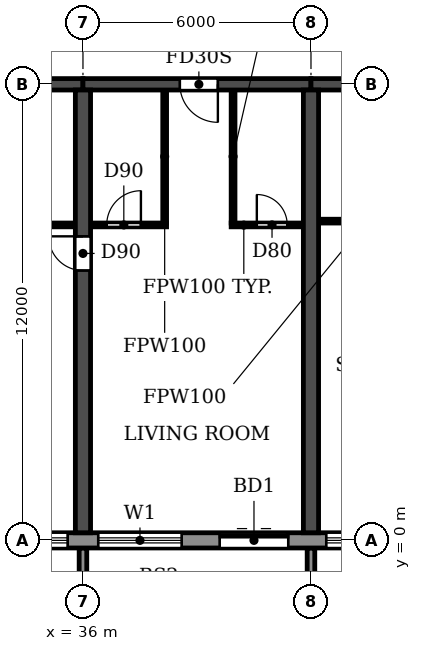
"""IFC4 building model, lengths in metres.
Left out: names, types, materials, properties, quantities, classifications, styles, units other than length and angle.
Written with IfcOpenShell. Run it as: python <this file> out.ifc"""

import sys

from ifc_helpers import new_model, si_unit, direction, frame, frame_2d, origin, place, context, subcontext, project, spatial, polyline, rectangle, outline, extrude, source, transform, mapped, element, fill, save


model = new_model("IFC4")
c1 = context("Model", 3, precision=1e-05, world=origin(), true_north=direction((0.0, 1.0)))
c2 = subcontext(c1, "Body", "Model", "MODEL_VIEW")
j1 = project(units=[si_unit("LENGTHUNIT", "METRE"), si_unit("PLANEANGLEUNIT", "RADIAN")], contexts=[c1])
p1 = place(None, origin())
s1 = spatial("IfcSite", under=j1, at=p1, CompositionType="ELEMENT")
p2 = place(p1, origin())
s2 = spatial("IfcBuilding", under=s1, at=p2, CompositionType="ELEMENT")
p3 = place(p2, frame((0.0, 0.0, 43.2)))
s3 = spatial("IfcBuildingStorey", under=s2, at=p3, CompositionType="ELEMENT", Elevation=43.2)
p4 = place(p3, frame((36.0, 0.2, 0.0), z_axis=(0.0, 0.0, 1.0), x_axis=(0.0, 1.0, 0.0)))
e1 = element("IfcWall", 1, at=p4, inside=s3, PredefinedType="SHEAR", context=c2, shape_type="SweptSolid", body=[
    extrude(rectangle(XDim=11.65, YDim=0.4, at=frame_2d((5.825, 0.0))), origin(), (0.0, 0.0, 1.0), 3.05),
])
p5 = place(p4, frame((6.9, 0.0, 0.0)))
e2 = element("IfcOpeningElement", 2, at=p5, cuts=e1, PredefinedType="OPENING", context=c2, shape_type="SweptSolid", body=[
    extrude(rectangle(XDim=0.9, YDim=2.1, at=frame_2d((0.45, 1.05))), frame((0.0, 0.21, 0.0), z_axis=(0.0, -1.0, 0.0), x_axis=(1.0, 0.0, 0.0)), (0.0, 0.0, 1.0), 0.42),
])
p6 = place(p3, frame((42.0, 0.2, 0.0), z_axis=(0.0, 0.0, 1.0), x_axis=(0.0, 1.0, 0.0)))
e3 = element("IfcWall", 3, at=p6, inside=s3, PredefinedType="SHEAR", context=c2, shape_type="SweptSolid", body=[
    extrude(rectangle(XDim=11.65, YDim=0.4, at=frame_2d((5.825, 0.0))), origin(), (0.0, 0.0, 1.0), 3.05),
])
p7 = place(p3, frame((30.0, 12.0, 0.0), z_axis=(0.0, 0.0, 1.0), x_axis=(1.0, 0.0, 0.0)))
e4 = element("IfcWall", 4, at=p7, inside=s3, PredefinedType="SHEAR", context=c2, shape_type="SweptSolid", body=[
    extrude(rectangle(XDim=6.0, YDim=0.3, at=frame_2d((3.0, 0.0))), origin(), (0.0, 0.0, 1.0), 2.45),
])
p8 = place(p3, frame((36.0, 12.0, 0.0), z_axis=(0.0, 0.0, 1.0), x_axis=(1.0, 0.0, 0.0)))
e5 = element("IfcWall", 5, at=p8, inside=s3, PredefinedType="SHEAR", context=c2, shape_type="SweptSolid", body=[
    extrude(rectangle(XDim=6.0, YDim=0.3, at=frame_2d((3.0, 0.0))), origin(), (0.0, 0.0, 1.0), 2.45),
])
p9 = place(p8, frame((2.55, 0.0, 0.0)))
e6 = element("IfcOpeningElement", 6, at=p9, cuts=e5, PredefinedType="OPENING", context=c2, shape_type="SweptSolid", body=[
    extrude(rectangle(XDim=1.0, YDim=2.1, at=frame_2d((0.5, 1.05))), frame((0.0, 0.16, 0.0), z_axis=(0.0, -1.0, 0.0), x_axis=(1.0, 0.0, 0.0)), (0.0, 0.0, 1.0), 0.32),
])
p10 = place(p3, frame((42.0, 12.0, 0.0), z_axis=(0.0, 0.0, 1.0), x_axis=(1.0, 0.0, 0.0)))
e7 = element("IfcWall", 7, at=p10, inside=s3, PredefinedType="SHEAR", context=c2, shape_type="SweptSolid", body=[
    extrude(rectangle(XDim=6.0, YDim=0.3, at=frame_2d((3.0, 0.0))), origin(), (0.0, 0.0, 1.0), 2.45),
])
p11 = place(p10, frame((2.45, 0.0, 0.0)))
e8 = element("IfcOpeningElement", 8, at=p11, cuts=e7, PredefinedType="OPENING", context=c2, shape_type="SweptSolid", body=[
    extrude(rectangle(XDim=1.0, YDim=2.1, at=frame_2d((0.5, 1.05))), frame((0.0, 0.16, 0.0), z_axis=(0.0, -1.0, 0.0), x_axis=(1.0, 0.0, 0.0)), (0.0, 0.0, 1.0), 0.32),
])
p12 = place(p3, frame((4.683, 0.0, 0.0), z_axis=(0.0, 0.0, 1.0), x_axis=(1.0, 0.0, 0.0)))
e9 = element("IfcWall", 9, at=p12, inside=s3, PredefinedType="STANDARD", context=c2, shape_type="SweptSolid", body=[
    extrude(rectangle(XDim=92.634, YDim=0.4, at=frame_2d((46.317, 0.0))), origin(), (0.0, 0.0, 1.0), 3.05),
])
p13 = place(p12, frame((1.717, 0.0, 0.9)))
e10 = element("IfcOpeningElement", 10, at=p13, cuts=e9, PredefinedType="OPENING", context=c2, shape_type="SweptSolid", body=[
    extrude(rectangle(XDim=2.2, YDim=1.5, at=frame_2d((1.1, 0.75))), frame((0.0, 0.21, 0.0), z_axis=(0.0, -1.0, 0.0), x_axis=(1.0, 0.0, 0.0)), (0.0, 0.0, 1.0), 0.42),
])
p14 = place(p12, frame((4.717, 0.0, 0.9)))
e11 = element("IfcOpeningElement", 11, at=p14, cuts=e9, PredefinedType="OPENING", context=c2, shape_type="SweptSolid", body=[
    extrude(rectangle(XDim=2.2, YDim=1.5, at=frame_2d((1.1, 0.75))), frame((0.0, 0.21, 0.0), z_axis=(0.0, -1.0, 0.0), x_axis=(1.0, 0.0, 0.0)), (0.0, 0.0, 1.0), 0.42),
])
p15 = place(p12, frame((7.717, 0.0, 0.9)))
e12 = element("IfcOpeningElement", 12, at=p15, cuts=e9, PredefinedType="OPENING", context=c2, shape_type="SweptSolid", body=[
    extrude(rectangle(XDim=2.2, YDim=1.5, at=frame_2d((1.1, 0.75))), frame((0.0, 0.21, 0.0), z_axis=(0.0, -1.0, 0.0), x_axis=(1.0, 0.0, 0.0)), (0.0, 0.0, 1.0), 0.42),
])
p16 = place(p12, frame((10.917, 0.0, 0.0)))
e13 = element("IfcOpeningElement", 13, at=p16, cuts=e9, PredefinedType="OPENING", context=c2, shape_type="SweptSolid", body=[
    extrude(rectangle(XDim=1.8, YDim=2.4, at=frame_2d((0.9, 1.2))), frame((0.0, 0.21, 0.0), z_axis=(0.0, -1.0, 0.0), x_axis=(1.0, 0.0, 0.0)), (0.0, 0.0, 1.0), 0.42),
])
p17 = place(p12, frame((13.717, 0.0, 0.9)))
e14 = element("IfcOpeningElement", 14, at=p17, cuts=e9, PredefinedType="OPENING", context=c2, shape_type="SweptSolid", body=[
    extrude(rectangle(XDim=2.2, YDim=1.5, at=frame_2d((1.1, 0.75))), frame((0.0, 0.21, 0.0), z_axis=(0.0, -1.0, 0.0), x_axis=(1.0, 0.0, 0.0)), (0.0, 0.0, 1.0), 0.42),
])
p18 = place(p12, frame((16.717, 0.0, 0.9)))
e15 = element("IfcOpeningElement", 15, at=p18, cuts=e9, PredefinedType="OPENING", context=c2, shape_type="SweptSolid", body=[
    extrude(rectangle(XDim=2.2, YDim=1.5, at=frame_2d((1.1, 0.75))), frame((0.0, 0.21, 0.0), z_axis=(0.0, -1.0, 0.0), x_axis=(1.0, 0.0, 0.0)), (0.0, 0.0, 1.0), 0.42),
])
p19 = place(p12, frame((19.917, 0.0, 0.0)))
e16 = element("IfcOpeningElement", 16, at=p19, cuts=e9, PredefinedType="OPENING", context=c2, shape_type="SweptSolid", body=[
    extrude(rectangle(XDim=1.8, YDim=2.4, at=frame_2d((0.9, 1.2))), frame((0.0, 0.21, 0.0), z_axis=(0.0, -1.0, 0.0), x_axis=(1.0, 0.0, 0.0)), (0.0, 0.0, 1.0), 0.42),
])
p20 = place(p12, frame((22.717, 0.0, 0.9)))
e17 = element("IfcOpeningElement", 17, at=p20, cuts=e9, PredefinedType="OPENING", context=c2, shape_type="SweptSolid", body=[
    extrude(rectangle(XDim=2.2, YDim=1.5, at=frame_2d((1.1, 0.75))), frame((0.0, 0.21, 0.0), z_axis=(0.0, -1.0, 0.0), x_axis=(1.0, 0.0, 0.0)), (0.0, 0.0, 1.0), 0.42),
])
p21 = place(p12, frame((25.717, 0.0, 0.9)))
e18 = element("IfcOpeningElement", 18, at=p21, cuts=e9, PredefinedType="OPENING", context=c2, shape_type="SweptSolid", body=[
    extrude(rectangle(XDim=2.2, YDim=1.5, at=frame_2d((1.1, 0.75))), frame((0.0, 0.21, 0.0), z_axis=(0.0, -1.0, 0.0), x_axis=(1.0, 0.0, 0.0)), (0.0, 0.0, 1.0), 0.42),
])
p22 = place(p12, frame((28.717, 0.0, 0.9)))
e19 = element("IfcOpeningElement", 19, at=p22, cuts=e9, PredefinedType="OPENING", context=c2, shape_type="SweptSolid", body=[
    extrude(rectangle(XDim=2.2, YDim=1.5, at=frame_2d((1.1, 0.75))), frame((0.0, 0.21, 0.0), z_axis=(0.0, -1.0, 0.0), x_axis=(1.0, 0.0, 0.0)), (0.0, 0.0, 1.0), 0.42),
])
p23 = place(p12, frame((31.717, 0.0, 0.9)))
e20 = element("IfcOpeningElement", 20, at=p23, cuts=e9, PredefinedType="OPENING", context=c2, shape_type="SweptSolid", body=[
    extrude(rectangle(XDim=2.2, YDim=1.5, at=frame_2d((1.1, 0.75))), frame((0.0, 0.21, 0.0), z_axis=(0.0, -1.0, 0.0), x_axis=(1.0, 0.0, 0.0)), (0.0, 0.0, 1.0), 0.42),
])
p24 = place(p12, frame((34.917, 0.0, 0.0)))
e21 = element("IfcOpeningElement", 21, at=p24, cuts=e9, PredefinedType="OPENING", context=c2, shape_type="SweptSolid", body=[
    extrude(rectangle(XDim=1.8, YDim=2.4, at=frame_2d((0.9, 1.2))), frame((0.0, 0.21, 0.0), z_axis=(0.0, -1.0, 0.0), x_axis=(1.0, 0.0, 0.0)), (0.0, 0.0, 1.0), 0.42),
])
p25 = place(p12, frame((37.717, 0.0, 0.9)))
e22 = element("IfcOpeningElement", 22, at=p25, cuts=e9, PredefinedType="OPENING", context=c2, shape_type="SweptSolid", body=[
    extrude(rectangle(XDim=2.2, YDim=1.5, at=frame_2d((1.1, 0.75))), frame((0.0, 0.21, 0.0), z_axis=(0.0, -1.0, 0.0), x_axis=(1.0, 0.0, 0.0)), (0.0, 0.0, 1.0), 0.42),
])
p26 = place(p12, frame((40.717, 0.0, 0.9)))
e23 = element("IfcOpeningElement", 23, at=p26, cuts=e9, PredefinedType="OPENING", context=c2, shape_type="SweptSolid", body=[
    extrude(rectangle(XDim=2.2, YDim=1.5, at=frame_2d((1.1, 0.75))), frame((0.0, 0.21, 0.0), z_axis=(0.0, -1.0, 0.0), x_axis=(1.0, 0.0, 0.0)), (0.0, 0.0, 1.0), 0.42),
])
p27 = place(p12, frame((43.717, 0.0, 0.9)))
e24 = element("IfcOpeningElement", 24, at=p27, cuts=e9, PredefinedType="OPENING", context=c2, shape_type="SweptSolid", body=[
    extrude(rectangle(XDim=2.2, YDim=1.5, at=frame_2d((1.1, 0.75))), frame((0.0, 0.21, 0.0), z_axis=(0.0, -1.0, 0.0), x_axis=(1.0, 0.0, 0.0)), (0.0, 0.0, 1.0), 0.42),
])
p28 = place(p12, frame((46.917, 0.0, 0.0)))
e25 = element("IfcOpeningElement", 25, at=p28, cuts=e9, PredefinedType="OPENING", context=c2, shape_type="SweptSolid", body=[
    extrude(rectangle(XDim=1.8, YDim=2.4, at=frame_2d((0.9, 1.2))), frame((0.0, 0.21, 0.0), z_axis=(0.0, -1.0, 0.0), x_axis=(1.0, 0.0, 0.0)), (0.0, 0.0, 1.0), 0.42),
])
p29 = place(p12, frame((49.717, 0.0, 0.9)))
e26 = element("IfcOpeningElement", 26, at=p29, cuts=e9, PredefinedType="OPENING", context=c2, shape_type="SweptSolid", body=[
    extrude(rectangle(XDim=2.2, YDim=1.5, at=frame_2d((1.1, 0.75))), frame((0.0, 0.21, 0.0), z_axis=(0.0, -1.0, 0.0), x_axis=(1.0, 0.0, 0.0)), (0.0, 0.0, 1.0), 0.42),
])
p30 = place(p12, frame((52.717, 0.0, 0.9)))
e27 = element("IfcOpeningElement", 27, at=p30, cuts=e9, PredefinedType="OPENING", context=c2, shape_type="SweptSolid", body=[
    extrude(rectangle(XDim=2.2, YDim=1.5, at=frame_2d((1.1, 0.75))), frame((0.0, 0.21, 0.0), z_axis=(0.0, -1.0, 0.0), x_axis=(1.0, 0.0, 0.0)), (0.0, 0.0, 1.0), 0.42),
])
p31 = place(p12, frame((55.717, 0.0, 0.9)))
e28 = element("IfcOpeningElement", 28, at=p31, cuts=e9, PredefinedType="OPENING", context=c2, shape_type="SweptSolid", body=[
    extrude(rectangle(XDim=2.2, YDim=1.5, at=frame_2d((1.1, 0.75))), frame((0.0, 0.21, 0.0), z_axis=(0.0, -1.0, 0.0), x_axis=(1.0, 0.0, 0.0)), (0.0, 0.0, 1.0), 0.42),
])
p32 = place(p12, frame((58.917, 0.0, 0.0)))
e29 = element("IfcOpeningElement", 29, at=p32, cuts=e9, PredefinedType="OPENING", context=c2, shape_type="SweptSolid", body=[
    extrude(rectangle(XDim=1.8, YDim=2.4, at=frame_2d((0.9, 1.2))), frame((0.0, 0.21, 0.0), z_axis=(0.0, -1.0, 0.0), x_axis=(1.0, 0.0, 0.0)), (0.0, 0.0, 1.0), 0.42),
])
p33 = place(p12, frame((61.717, 0.0, 0.9)))
e30 = element("IfcOpeningElement", 30, at=p33, cuts=e9, PredefinedType="OPENING", context=c2, shape_type="SweptSolid", body=[
    extrude(rectangle(XDim=2.2, YDim=1.5, at=frame_2d((1.1, 0.75))), frame((0.0, 0.21, 0.0), z_axis=(0.0, -1.0, 0.0), x_axis=(1.0, 0.0, 0.0)), (0.0, 0.0, 1.0), 0.42),
])
p34 = place(p12, frame((64.717, 0.0, 0.9)))
e31 = element("IfcOpeningElement", 31, at=p34, cuts=e9, PredefinedType="OPENING", context=c2, shape_type="SweptSolid", body=[
    extrude(rectangle(XDim=2.2, YDim=1.5, at=frame_2d((1.1, 0.75))), frame((0.0, 0.21, 0.0), z_axis=(0.0, -1.0, 0.0), x_axis=(1.0, 0.0, 0.0)), (0.0, 0.0, 1.0), 0.42),
])
p35 = place(p12, frame((67.717, 0.0, 0.9)))
e32 = element("IfcOpeningElement", 32, at=p35, cuts=e9, PredefinedType="OPENING", context=c2, shape_type="SweptSolid", body=[
    extrude(rectangle(XDim=2.2, YDim=1.5, at=frame_2d((1.1, 0.75))), frame((0.0, 0.21, 0.0), z_axis=(0.0, -1.0, 0.0), x_axis=(1.0, 0.0, 0.0)), (0.0, 0.0, 1.0), 0.42),
])
p36 = place(p12, frame((70.917, 0.0, 0.0)))
e33 = element("IfcOpeningElement", 33, at=p36, cuts=e9, PredefinedType="OPENING", context=c2, shape_type="SweptSolid", body=[
    extrude(rectangle(XDim=1.8, YDim=2.4, at=frame_2d((0.9, 1.2))), frame((0.0, 0.21, 0.0), z_axis=(0.0, -1.0, 0.0), x_axis=(1.0, 0.0, 0.0)), (0.0, 0.0, 1.0), 0.42),
])
p37 = place(p12, frame((73.717, 0.0, 0.9)))
e34 = element("IfcOpeningElement", 34, at=p37, cuts=e9, PredefinedType="OPENING", context=c2, shape_type="SweptSolid", body=[
    extrude(rectangle(XDim=2.2, YDim=1.5, at=frame_2d((1.1, 0.75))), frame((0.0, 0.21, 0.0), z_axis=(0.0, -1.0, 0.0), x_axis=(1.0, 0.0, 0.0)), (0.0, 0.0, 1.0), 0.42),
])
p38 = place(p12, frame((76.717, 0.0, 0.9)))
e35 = element("IfcOpeningElement", 35, at=p38, cuts=e9, PredefinedType="OPENING", context=c2, shape_type="SweptSolid", body=[
    extrude(rectangle(XDim=2.2, YDim=1.5, at=frame_2d((1.1, 0.75))), frame((0.0, 0.21, 0.0), z_axis=(0.0, -1.0, 0.0), x_axis=(1.0, 0.0, 0.0)), (0.0, 0.0, 1.0), 0.42),
])
p39 = place(p12, frame((79.717, 0.0, 0.9)))
e36 = element("IfcOpeningElement", 36, at=p39, cuts=e9, PredefinedType="OPENING", context=c2, shape_type="SweptSolid", body=[
    extrude(rectangle(XDim=2.2, YDim=1.5, at=frame_2d((1.1, 0.75))), frame((0.0, 0.21, 0.0), z_axis=(0.0, -1.0, 0.0), x_axis=(1.0, 0.0, 0.0)), (0.0, 0.0, 1.0), 0.42),
])
p40 = place(p12, frame((82.917, 0.0, 0.0)))
e37 = element("IfcOpeningElement", 37, at=p40, cuts=e9, PredefinedType="OPENING", context=c2, shape_type="SweptSolid", body=[
    extrude(rectangle(XDim=1.8, YDim=2.4, at=frame_2d((0.9, 1.2))), frame((0.0, 0.21, 0.0), z_axis=(0.0, -1.0, 0.0), x_axis=(1.0, 0.0, 0.0)), (0.0, 0.0, 1.0), 0.42),
])
p41 = place(p12, frame((85.717, 0.0, 0.9)))
e38 = element("IfcOpeningElement", 38, at=p41, cuts=e9, PredefinedType="OPENING", context=c2, shape_type="SweptSolid", body=[
    extrude(rectangle(XDim=2.2, YDim=1.5, at=frame_2d((1.1, 0.75))), frame((0.0, 0.21, 0.0), z_axis=(0.0, -1.0, 0.0), x_axis=(1.0, 0.0, 0.0)), (0.0, 0.0, 1.0), 0.42),
])
p42 = place(p12, frame((88.717, 0.0, 0.9)))
e39 = element("IfcOpeningElement", 39, at=p42, cuts=e9, PredefinedType="OPENING", context=c2, shape_type="SweptSolid", body=[
    extrude(rectangle(XDim=2.2, YDim=1.5, at=frame_2d((1.1, 0.75))), frame((0.0, 0.21, 0.0), z_axis=(0.0, -1.0, 0.0), x_axis=(1.0, 0.0, 0.0)), (0.0, 0.0, 1.0), 0.42),
])
m1 = source(origin(), c2, "Body", "SweptSolid", [
    extrude(outline(polyline([(0.0, 0.0), (0.2, 0.0), (0.2, 1.65), (0.0, 1.65), (0.0, 0.0)])), origin(), (0.0, 0.0, 1.0), 3.1),
])
for number, where in (
    (40, (35.9, -1.85, 0.0)),
    (41, (41.9, -1.85, 0.0)),
):
    element("IfcWall", number, at=place(p3, frame(where)), inside=s3, PredefinedType="STANDARD", context=c2, shape_type="MappedRepresentation", body=[
        mapped(m1, transform((0.0, 0.0, 0.0))),
    ])
p43 = place(p3, frame((33.1, 8.3, 0.0), z_axis=(0.0, 0.0, 1.0), x_axis=(1.0, 0.0, 0.0)))
e42 = element("IfcWall", 42, at=p43, inside=s3, PredefinedType="PARTITIONING", context=c2, shape_type="SweptSolid", body=[
    extrude(rectangle(XDim=2.69, YDim=0.1, at=frame_2d((1.345, 0.0))), origin(), (0.0, 0.0, 1.0), 3.05),
])
p44 = place(p43, frame((1.0, 0.0, 0.0)))
e43 = element("IfcOpeningElement", 43, at=p44, cuts=e42, PredefinedType="OPENING", context=c2, shape_type="SweptSolid", body=[
    extrude(rectangle(XDim=0.8, YDim=2.1, at=frame_2d((0.4, 1.05))), frame((0.0, 0.06, 0.0), z_axis=(0.0, -1.0, 0.0), x_axis=(1.0, 0.0, 0.0)), (0.0, 0.0, 1.0), 0.12),
])
p45 = place(p3, frame((36.21, 8.3, 0.0), z_axis=(0.0, 0.0, 1.0), x_axis=(1.0, 0.0, 0.0)))
e44 = element("IfcWall", 44, at=p45, inside=s3, PredefinedType="PARTITIONING", context=c2, shape_type="SweptSolid", body=[
    extrude(rectangle(XDim=1.99, YDim=0.1, at=frame_2d((0.995, 0.0))), origin(), (0.0, 0.0, 1.0), 3.05),
])
p46 = place(p45, frame((0.415, 0.0, 0.0)))
e45 = element("IfcOpeningElement", 45, at=p46, cuts=e44, PredefinedType="OPENING", context=c2, shape_type="SweptSolid", body=[
    extrude(rectangle(XDim=0.9, YDim=2.1, at=frame_2d((0.45, 1.05))), frame((0.0, 0.06, 0.0), z_axis=(0.0, -1.0, 0.0), x_axis=(1.0, 0.0, 0.0)), (0.0, 0.0, 1.0), 0.12),
])
p47 = place(p3, frame((39.9, 8.3, 0.0), z_axis=(0.0, 0.0, 1.0), x_axis=(1.0, 0.0, 0.0)))
e46 = element("IfcWall", 46, at=p47, inside=s3, PredefinedType="PARTITIONING", context=c2, shape_type="SweptSolid", body=[
    extrude(rectangle(XDim=1.89, YDim=0.1, at=frame_2d((0.945, 0.0))), origin(), (0.0, 0.0, 1.0), 3.05),
])
p48 = place(p47, frame((0.675, 0.0, 0.0)))
e47 = element("IfcOpeningElement", 47, at=p48, cuts=e46, PredefinedType="OPENING", context=c2, shape_type="SweptSolid", body=[
    extrude(rectangle(XDim=0.8, YDim=2.1, at=frame_2d((0.4, 1.05))), frame((0.0, 0.06, 0.0), z_axis=(0.0, -1.0, 0.0), x_axis=(1.0, 0.0, 0.0)), (0.0, 0.0, 1.0), 0.12),
])
p49 = place(p3, frame((42.21, 8.4, 0.0), z_axis=(0.0, 0.0, 1.0), x_axis=(1.0, 0.0, 0.0)))
e48 = element("IfcWall", 48, at=p49, inside=s3, PredefinedType="PARTITIONING", context=c2, shape_type="SweptSolid", body=[
    extrude(rectangle(XDim=1.89, YDim=0.1, at=frame_2d((0.945, 0.0))), origin(), (0.0, 0.0, 1.0), 3.05),
])
for number, where, z_axis, x_axis in (
    (49, (38.15, 8.35, 0.0), (0.0, 0.0, 1.0), (0.0, 1.0, 0.0)),
    (50, (39.95, 8.35, 0.0), (0.0, 0.0, 1.0), (0.0, 1.0, 0.0)),
):
    element("IfcWall", number, at=place(p3, frame(where, z_axis=z_axis, x_axis=x_axis)), inside=s3, PredefinedType="PARTITIONING", context=c2, shape_type="SweptSolid", body=[
        extrude(rectangle(XDim=3.49, YDim=0.1, at=frame_2d((1.745, 0.0))), origin(), (0.0, 0.0, 1.0), 3.05),
    ])
p50 = place(p22, origin())
e51 = element("IfcWindow", 51, at=p50, inside=s3, PartitioningType="DOUBLE_PANEL_HORIZONTAL", PredefinedType="WINDOW", context=c2, shape_type="SweptSolid", body=[
    extrude(rectangle(XDim=2.2, YDim=1.5, at=frame_2d((1.1, 0.75))), frame((0.0, 0.03, 0.0), z_axis=(0.0, -1.0, 0.0), x_axis=(1.0, 0.0, 0.0)), (0.0, 0.0, 1.0), 0.06),
])
fill(e19, e51)
p51 = place(p23, origin())
e52 = element("IfcWindow", 52, at=p51, inside=s3, PartitioningType="DOUBLE_PANEL_HORIZONTAL", PredefinedType="WINDOW", context=c2, shape_type="SweptSolid", body=[
    extrude(rectangle(XDim=2.2, YDim=1.5, at=frame_2d((1.1, 0.75))), frame((0.0, 0.03, 0.0), z_axis=(0.0, -1.0, 0.0), x_axis=(1.0, 0.0, 0.0)), (0.0, 0.0, 1.0), 0.06),
])
fill(e20, e52)
p52 = place(p24, origin())
e53 = element("IfcDoor", 53, at=p52, inside=s3, OperationType="DOUBLE_DOOR_SLIDING", PredefinedType="DOOR", context=c2, shape_type="SweptSolid", body=[
    extrude(rectangle(XDim=1.8, YDim=2.4, at=frame_2d((0.9, 1.2))), frame((0.0, 0.025, 0.0), z_axis=(0.0, -1.0, 0.0), x_axis=(1.0, 0.0, 0.0)), (0.0, 0.0, 1.0), 0.05),
])
fill(e21, e53)
p53 = place(p25, origin())
e54 = element("IfcWindow", 54, at=p53, inside=s3, PartitioningType="DOUBLE_PANEL_HORIZONTAL", PredefinedType="WINDOW", context=c2, shape_type="SweptSolid", body=[
    extrude(rectangle(XDim=2.2, YDim=1.5, at=frame_2d((1.1, 0.75))), frame((0.0, 0.03, 0.0), z_axis=(0.0, -1.0, 0.0), x_axis=(1.0, 0.0, 0.0)), (0.0, 0.0, 1.0), 0.06),
])
fill(e22, e54)
p54 = place(p5, origin())
e55 = element("IfcDoor", 55, at=p54, inside=s3, OperationType="SINGLE_SWING_RIGHT", PredefinedType="DOOR", context=c2, shape_type="SweptSolid", body=[
    extrude(rectangle(XDim=0.9, YDim=2.1, at=frame_2d((0.45, 1.05))), frame((0.0, 0.025, 0.0), z_axis=(0.0, -1.0, 0.0), x_axis=(1.0, 0.0, 0.0)), (0.0, 0.0, 1.0), 0.05),
])
fill(e2, e55)
p55 = place(p46, origin())
e56 = element("IfcDoor", 56, at=p55, inside=s3, OperationType="SINGLE_SWING_RIGHT", PredefinedType="DOOR", context=c2, shape_type="SweptSolid", body=[
    extrude(rectangle(XDim=0.9, YDim=2.1, at=frame_2d((0.45, 1.05))), frame((0.0, 0.025, 0.0), z_axis=(0.0, -1.0, 0.0), x_axis=(1.0, 0.0, 0.0)), (0.0, 0.0, 1.0), 0.05),
])
fill(e45, e56)
p56 = place(p9, frame((1.0, 0.0, 0.0), z_axis=(0.0, 0.0, 1.0), x_axis=(-1.0, 0.0, 0.0)))
e57 = element("IfcDoor", 57, at=p56, inside=s3, OperationType="SINGLE_SWING_LEFT", PredefinedType="DOOR", context=c2, shape_type="SweptSolid", body=[
    extrude(rectangle(XDim=1.0, YDim=2.1, at=frame_2d((0.5, 1.05))), frame((0.0, 0.025, 0.0), z_axis=(0.0, -1.0, 0.0), x_axis=(1.0, 0.0, 0.0)), (0.0, 0.0, 1.0), 0.05),
])
fill(e6, e57)
p57 = place(p48, origin())
e58 = element("IfcDoor", 58, at=p57, inside=s3, OperationType="SINGLE_SWING_LEFT", PredefinedType="DOOR", context=c2, shape_type="SweptSolid", body=[
    extrude(rectangle(XDim=0.8, YDim=2.1, at=frame_2d((0.4, 1.05))), frame((0.0, 0.025, 0.0), z_axis=(0.0, -1.0, 0.0), x_axis=(1.0, 0.0, 0.0)), (0.0, 0.0, 1.0), 0.05),
])
fill(e47, e58)
save(model, sys.argv[1])
